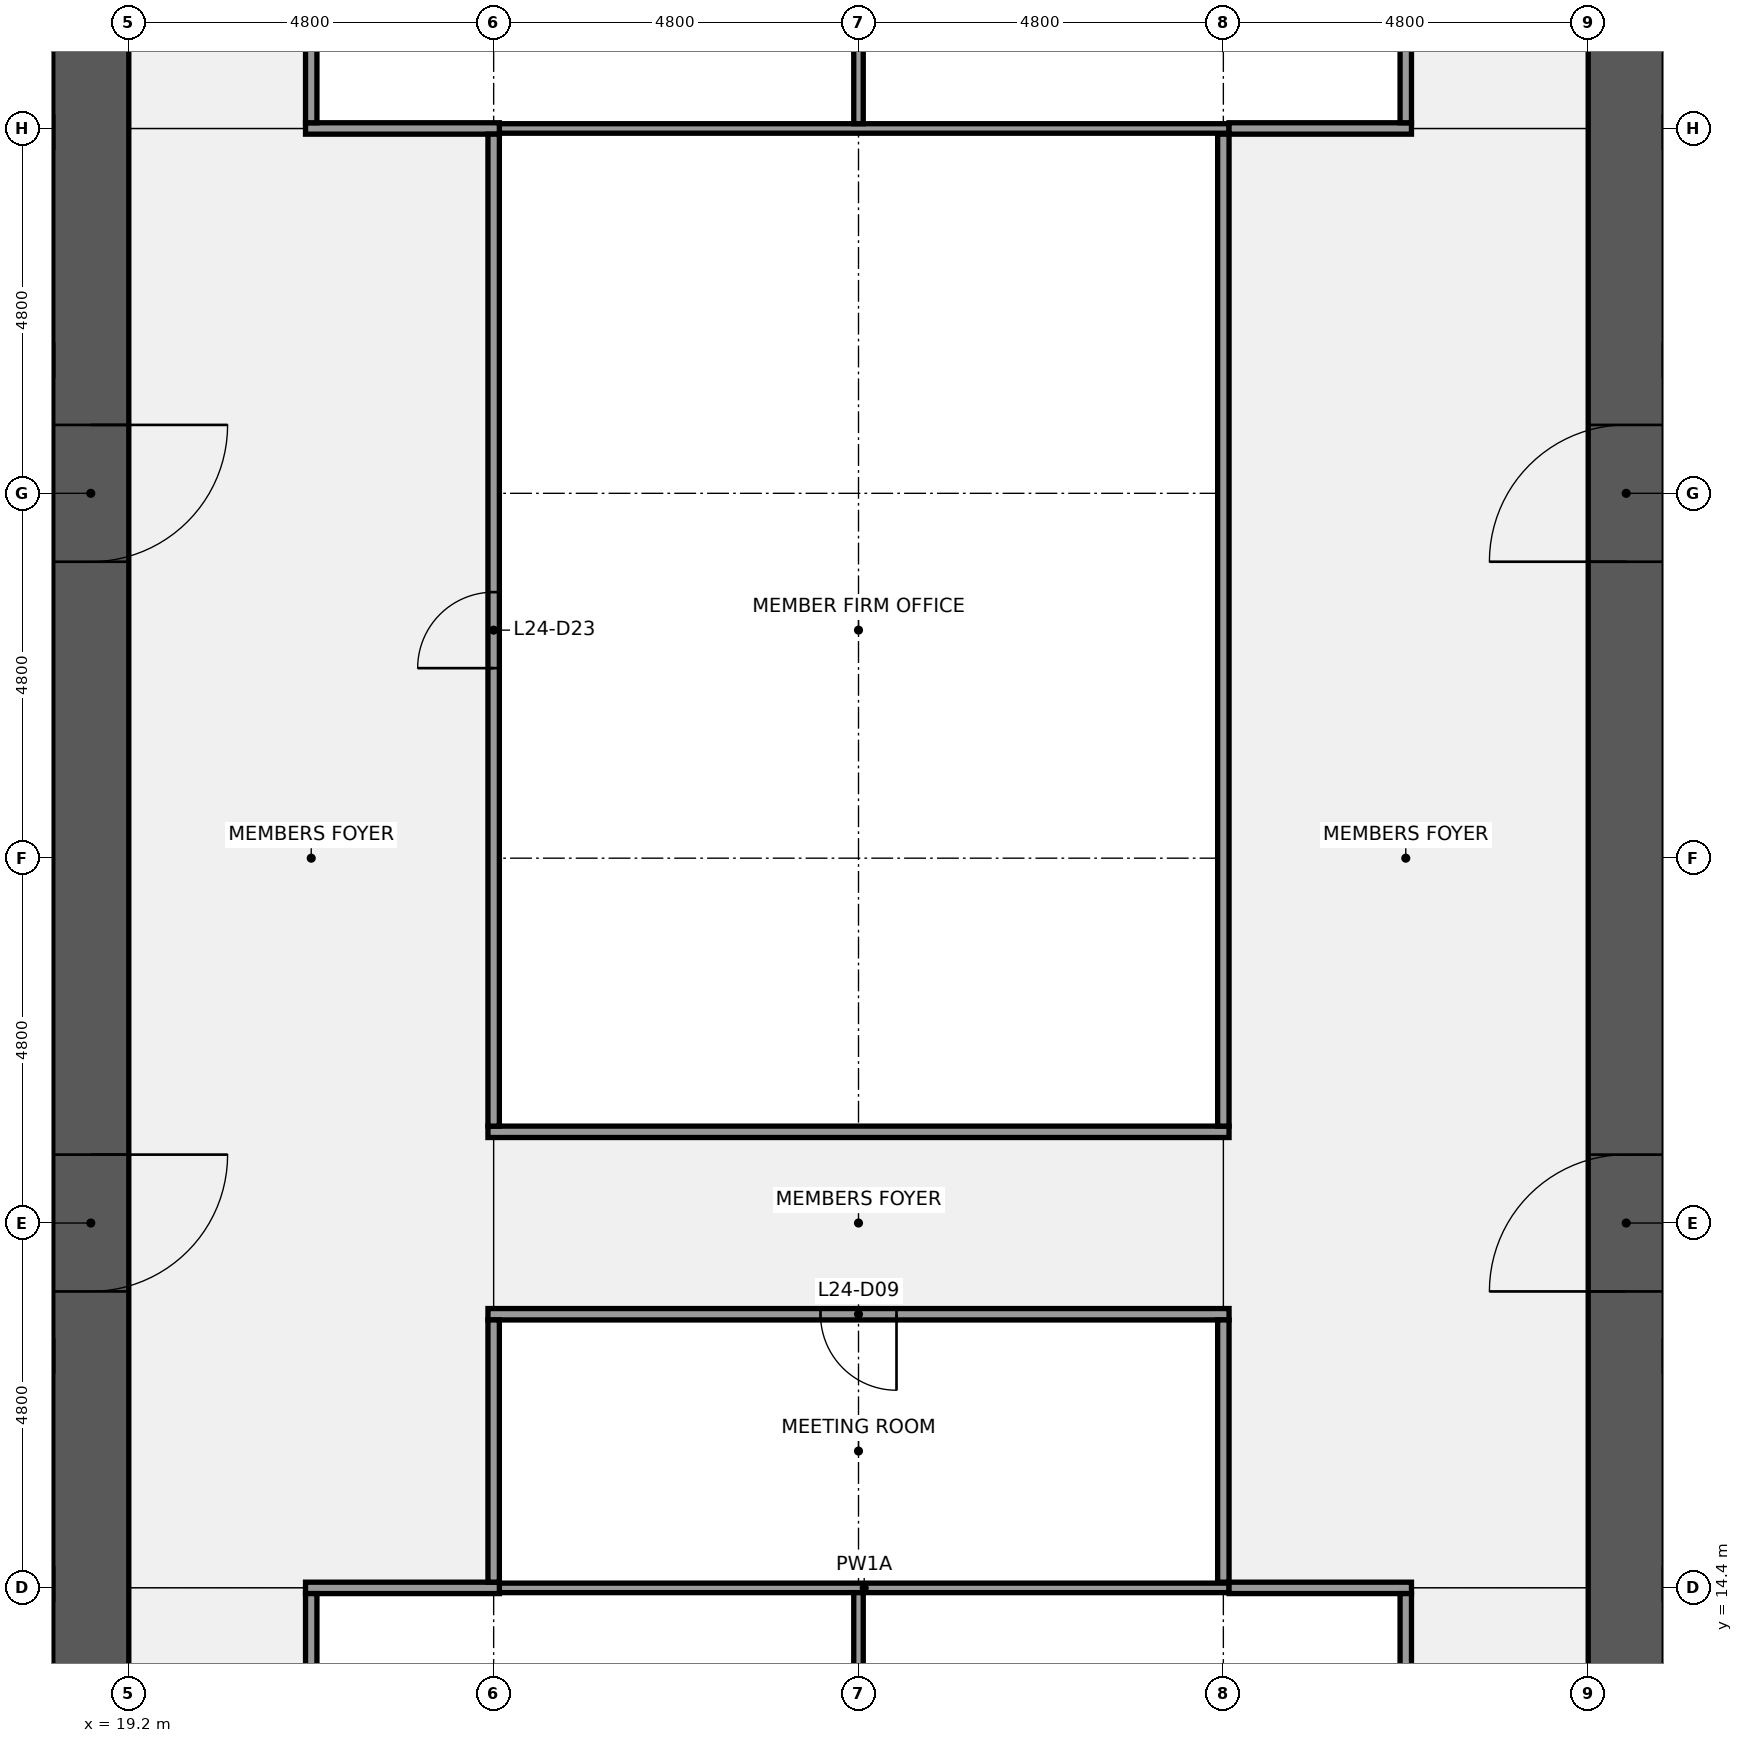
"""IFC4 building model, lengths in metres.
Left out: names, types, materials, properties, quantities, classifications, styles, units other than length and angle.
Written with IfcOpenShell. Run it as: python <this file> out.ifc"""

import sys

from ifc_helpers import new_model, si_unit, direction, frame, frame_2d, origin, place, context, subcontext, project, spatial, rectangle, extrude, element, fill, save


model = new_model("IFC4")
c1 = context("Model", 3, precision=1e-05, world=origin(), true_north=direction((0.0, 1.0)))
c2 = subcontext(c1, "Body", "Model", "MODEL_VIEW")
j1 = project(units=[si_unit("LENGTHUNIT", "METRE"), si_unit("PLANEANGLEUNIT", "RADIAN")], contexts=[c1])
p1 = place(None, origin())
s1 = spatial("IfcSite", under=j1, at=p1, CompositionType="ELEMENT")
p2 = place(p1, origin())
s2 = spatial("IfcBuilding", under=s1, at=p2, CompositionType="ELEMENT")
p3 = place(p2, frame((0.0, 0.0, 116.1)))
s3 = spatial("IfcBuildingStorey", under=s2, at=p3, CompositionType="ELEMENT", Elevation=116.1)
p4 = place(p3, frame((18.7, 38.4, 0.0), z_axis=(0.0, 0.0, 1.0), x_axis=(0.0, -1.0, 0.0)))
e1 = element("IfcWall", 1, at=p4, inside=s3, PredefinedType="SHEAR", context=c2, shape_type="SweptSolid", body=[
    extrude(rectangle(XDim=28.8, YDim=1.0, at=frame_2d((14.4, 0.0))), origin(), (0.0, 0.0, 1.0), 3.84),
])
p5 = place(p4, frame((18.3, 0.0, 0.0)))
e2 = element("IfcOpeningElement", 2, at=p5, cuts=e1, PredefinedType="OPENING", context=c2, shape_type="SweptSolid", body=[
    extrude(rectangle(XDim=1.8, YDim=2.1, at=frame_2d((0.9, 1.05))), frame((0.0, 0.51, 0.0), z_axis=(0.0, -1.0, 0.0), x_axis=(1.0, 0.0, 0.0)), (0.0, 0.0, 1.0), 1.02),
])
p6 = place(p4, frame((8.7, 0.0, 0.0)))
e3 = element("IfcOpeningElement", 3, at=p6, cuts=e1, PredefinedType="OPENING", context=c2, shape_type="SweptSolid", body=[
    extrude(rectangle(XDim=1.8, YDim=2.1, at=frame_2d((0.9, 1.05))), frame((0.0, 0.51, 0.0), z_axis=(0.0, -1.0, 0.0), x_axis=(1.0, 0.0, 0.0)), (0.0, 0.0, 1.0), 1.02),
])
p7 = place(p3, frame((1.0, 14.45, 0.0), z_axis=(0.0, 0.0, 1.0), x_axis=(1.0, 0.0, 0.0)))
e4 = element("IfcWall", 4, at=p7, inside=s3, PredefinedType="SHEAR", context=c2, shape_type="SweptSolid", body=[
    extrude(rectangle(XDim=17.2, YDim=0.4, at=frame_2d((8.6, 0.0))), origin(), (0.0, 0.0, 1.0), 3.84),
])
p8 = place(p3, frame((1.0, 17.45, 0.0), z_axis=(0.0, 0.0, 1.0), x_axis=(1.0, 0.0, 0.0)))
e5 = element("IfcWall", 5, at=p8, inside=s3, PredefinedType="SHEAR", context=c2, shape_type="SweptSolid", body=[
    extrude(rectangle(XDim=17.2, YDim=0.4, at=frame_2d((8.6, 0.0))), origin(), (0.0, 0.0, 1.0), 3.84),
])
p9 = place(p8, frame((3.163, 0.0, 0.0)))
e6 = element("IfcOpeningElement", 6, at=p9, cuts=e5, PredefinedType="OPENING", context=c2, shape_type="SweptSolid", body=[
    extrude(rectangle(XDim=1.0, YDim=2.1, at=frame_2d((0.5, 1.05))), frame((0.0, 0.21, 0.0), z_axis=(0.0, -1.0, 0.0), x_axis=(1.0, 0.0, 0.0)), (0.0, 0.0, 1.0), 0.42),
])
p10 = place(p8, frame((8.7, 0.0, 0.0)))
e7 = element("IfcOpeningElement", 7, at=p10, cuts=e5, PredefinedType="OPENING", context=c2, shape_type="SweptSolid", body=[
    extrude(rectangle(XDim=1.0, YDim=2.1, at=frame_2d((0.5, 1.05))), frame((0.0, 0.21, 0.0), z_axis=(0.0, -1.0, 0.0), x_axis=(1.0, 0.0, 0.0)), (0.0, 0.0, 1.0), 0.42),
])
p11 = place(p8, frame((12.0, 0.0, 0.0)))
e8 = element("IfcOpeningElement", 8, at=p11, cuts=e5, PredefinedType="OPENING", context=c2, shape_type="SweptSolid", body=[
    extrude(rectangle(XDim=1.0, YDim=2.1, at=frame_2d((0.5, 1.05))), frame((0.0, 0.21, 0.0), z_axis=(0.0, -1.0, 0.0), x_axis=(1.0, 0.0, 0.0)), (0.0, 0.0, 1.0), 0.42),
])
p12 = place(p8, frame((15.137, 0.0, 0.0)))
e9 = element("IfcOpeningElement", 9, at=p12, cuts=e5, PredefinedType="OPENING", context=c2, shape_type="SweptSolid", body=[
    extrude(rectangle(XDim=1.0, YDim=2.1, at=frame_2d((0.5, 1.05))), frame((0.0, 0.21, 0.0), z_axis=(0.0, -1.0, 0.0), x_axis=(1.0, 0.0, 0.0)), (0.0, 0.0, 1.0), 0.42),
])
p13 = place(p3, frame((1.0, 30.55, 0.0), z_axis=(0.0, 0.0, 1.0), x_axis=(1.0, 0.0, 0.0)))
e10 = element("IfcWall", 10, at=p13, inside=s3, PredefinedType="SHEAR", context=c2, shape_type="SweptSolid", body=[
    extrude(rectangle(XDim=17.2, YDim=0.4, at=frame_2d((8.6, 0.0))), origin(), (0.0, 0.0, 1.0), 3.84),
])
p14 = place(p13, frame((0.762, 0.0, 0.0)))
e11 = element("IfcOpeningElement", 11, at=p14, cuts=e10, PredefinedType="OPENING", context=c2, shape_type="SweptSolid", body=[
    extrude(rectangle(XDim=1.0, YDim=2.1, at=frame_2d((0.5, 1.05))), frame((0.0, 0.21, 0.0), z_axis=(0.0, -1.0, 0.0), x_axis=(1.0, 0.0, 0.0)), (0.0, 0.0, 1.0), 0.42),
])
p15 = place(p13, frame((4.5, 0.0, 0.0)))
e12 = element("IfcOpeningElement", 12, at=p15, cuts=e10, PredefinedType="OPENING", context=c2, shape_type="SweptSolid", body=[
    extrude(rectangle(XDim=1.0, YDim=2.1, at=frame_2d((0.5, 1.05))), frame((0.0, 0.21, 0.0), z_axis=(0.0, -1.0, 0.0), x_axis=(1.0, 0.0, 0.0)), (0.0, 0.0, 1.0), 0.42),
])
p16 = place(p13, frame((8.4, 0.0, 0.0)))
e13 = element("IfcOpeningElement", 13, at=p16, cuts=e10, PredefinedType="OPENING", context=c2, shape_type="SweptSolid", body=[
    extrude(rectangle(XDim=1.0, YDim=2.1, at=frame_2d((0.5, 1.05))), frame((0.0, 0.21, 0.0), z_axis=(0.0, -1.0, 0.0), x_axis=(1.0, 0.0, 0.0)), (0.0, 0.0, 1.0), 0.42),
])
p17 = place(p13, frame((11.4, 0.0, 0.0)))
e14 = element("IfcOpeningElement", 14, at=p17, cuts=e10, PredefinedType="OPENING", context=c2, shape_type="SweptSolid", body=[
    extrude(rectangle(XDim=1.0, YDim=2.1, at=frame_2d((0.5, 1.05))), frame((0.0, 0.21, 0.0), z_axis=(0.0, -1.0, 0.0), x_axis=(1.0, 0.0, 0.0)), (0.0, 0.0, 1.0), 0.42),
])
p18 = place(p13, frame((14.837, 0.0, 0.0)))
e15 = element("IfcOpeningElement", 15, at=p18, cuts=e10, PredefinedType="OPENING", context=c2, shape_type="SweptSolid", body=[
    extrude(rectangle(XDim=1.0, YDim=2.1, at=frame_2d((0.5, 1.05))), frame((0.0, 0.21, 0.0), z_axis=(0.0, -1.0, 0.0), x_axis=(1.0, 0.0, 0.0)), (0.0, 0.0, 1.0), 0.42),
])
p19 = place(p3, frame((1.0, 33.55, 0.0), z_axis=(0.0, 0.0, 1.0), x_axis=(1.0, 0.0, 0.0)))
e16 = element("IfcWall", 16, at=p19, inside=s3, PredefinedType="SHEAR", context=c2, shape_type="SweptSolid", body=[
    extrude(rectangle(XDim=17.2, YDim=0.4, at=frame_2d((8.6, 0.0))), origin(), (0.0, 0.0, 1.0), 3.84),
])
p20 = place(p3, frame((38.9, 9.6, 0.0), z_axis=(0.0, 0.0, 1.0), x_axis=(0.0, 1.0, 0.0)))
e17 = element("IfcWall", 17, at=p20, inside=s3, PredefinedType="SHEAR", context=c2, shape_type="SweptSolid", body=[
    extrude(rectangle(XDim=28.8, YDim=1.0, at=frame_2d((14.4, 0.0))), origin(), (0.0, 0.0, 1.0), 3.84),
])
p21 = place(p20, frame((8.7, 0.0, 0.0)))
e18 = element("IfcOpeningElement", 18, at=p21, cuts=e17, PredefinedType="OPENING", context=c2, shape_type="SweptSolid", body=[
    extrude(rectangle(XDim=1.8, YDim=2.1, at=frame_2d((0.9, 1.05))), frame((0.0, 0.51, 0.0), z_axis=(0.0, -1.0, 0.0), x_axis=(1.0, 0.0, 0.0)), (0.0, 0.0, 1.0), 1.02),
])
p22 = place(p20, frame((18.3, 0.0, 0.0)))
e19 = element("IfcOpeningElement", 19, at=p22, cuts=e17, PredefinedType="OPENING", context=c2, shape_type="SweptSolid", body=[
    extrude(rectangle(XDim=1.8, YDim=2.1, at=frame_2d((0.9, 1.05))), frame((0.0, 0.51, 0.0), z_axis=(0.0, -1.0, 0.0), x_axis=(1.0, 0.0, 0.0)), (0.0, 0.0, 1.0), 1.02),
])
p23 = place(p3, frame((24.075, 14.4, 0.0), z_axis=(0.0, 0.0, 1.0), x_axis=(1.0, 0.0, 0.0)))
e20 = element("IfcWall", 20, at=p23, inside=s3, PredefinedType="PARTITIONING", context=c2, shape_type="SweptSolid", body=[
    extrude(rectangle(XDim=9.6, YDim=0.125, at=frame_2d((4.8, 0.0))), origin(), (0.0, 0.0, 1.0), 2.936),
])
p24 = place(p3, frame((21.525, 14.4, 0.0), z_axis=(0.0, 0.0, 1.0), x_axis=(1.0, 0.0, 0.0)))
e21 = element("IfcWall", 21, at=p24, inside=s3, PredefinedType="PARTITIONING", context=c2, shape_type="SweptSolid", body=[
    extrude(rectangle(XDim=2.55, YDim=0.15, at=frame_2d((1.275, 0.0))), origin(), (0.0, 0.0, 1.0), 2.936),
])
p25 = place(p3, frame((33.675, 14.4, 0.0), z_axis=(0.0, 0.0, 1.0), x_axis=(1.0, 0.0, 0.0)))
e22 = element("IfcWall", 22, at=p25, inside=s3, PredefinedType="PARTITIONING", context=c2, shape_type="SweptSolid", body=[
    extrude(rectangle(XDim=2.4, YDim=0.15, at=frame_2d((1.2, 0.0))), origin(), (0.0, 0.0, 1.0), 2.936),
])
p26 = place(p3, frame((23.925, 18.0, 0.0), z_axis=(0.0, 0.0, 1.0), x_axis=(1.0, 0.0, 0.0)))
e23 = element("IfcWall", 23, at=p26, inside=s3, PredefinedType="PARTITIONING", context=c2, shape_type="SweptSolid", body=[
    extrude(rectangle(XDim=9.75, YDim=0.15, at=frame_2d((4.875, 0.0))), origin(), (0.0, 0.0, 1.0), 2.936),
])
p27 = place(p26, frame((4.375, 0.0, 0.0)))
e24 = element("IfcOpeningElement", 24, at=p27, cuts=e23, PredefinedType="OPENING", context=c2, shape_type="SweptSolid", body=[
    extrude(rectangle(XDim=1.0, YDim=2.1, at=frame_2d((0.5, 1.05))), frame((0.0, 0.085, 0.0), z_axis=(0.0, -1.0, 0.0), x_axis=(1.0, 0.0, 0.0)), (0.0, 0.0, 1.0), 0.17),
])
p28 = place(p3, frame((23.925, 20.4, 0.0), z_axis=(0.0, 0.0, 1.0), x_axis=(1.0, 0.0, 0.0)))
e25 = element("IfcWall", 25, at=p28, inside=s3, PredefinedType="PARTITIONING", context=c2, shape_type="SweptSolid", body=[
    extrude(rectangle(XDim=9.75, YDim=0.15, at=frame_2d((4.875, 0.0))), origin(), (0.0, 0.0, 1.0), 2.936),
])
p29 = place(p3, frame((24.075, 33.6, 0.0), z_axis=(0.0, 0.0, 1.0), x_axis=(1.0, 0.0, 0.0)))
e26 = element("IfcWall", 26, at=p29, inside=s3, PredefinedType="PARTITIONING", context=c2, shape_type="SweptSolid", body=[
    extrude(rectangle(XDim=9.6, YDim=0.125, at=frame_2d((4.8, 0.0))), origin(), (0.0, 0.0, 1.0), 2.936),
])
p30 = place(p3, frame((21.525, 33.6, 0.0), z_axis=(0.0, 0.0, 1.0), x_axis=(1.0, 0.0, 0.0)))
e27 = element("IfcWall", 27, at=p30, inside=s3, PredefinedType="PARTITIONING", context=c2, shape_type="SweptSolid", body=[
    extrude(rectangle(XDim=2.55, YDim=0.15, at=frame_2d((1.275, 0.0))), origin(), (0.0, 0.0, 1.0), 2.936),
])
p31 = place(p3, frame((33.675, 33.6, 0.0), z_axis=(0.0, 0.0, 1.0), x_axis=(1.0, 0.0, 0.0)))
e28 = element("IfcWall", 28, at=p31, inside=s3, PredefinedType="PARTITIONING", context=c2, shape_type="SweptSolid", body=[
    extrude(rectangle(XDim=2.4, YDim=0.15, at=frame_2d((1.2, 0.0))), origin(), (0.0, 0.0, 1.0), 2.936),
])
for number, where, z_axis, x_axis in (
    (29, (21.6, 9.675, 0.0), (0.0, 0.0, 1.0), (0.0, 1.0, 0.0)),
    (30, (21.6, 33.675, 0.0), (0.0, 0.0, 1.0), (0.0, 1.0, 0.0)),
):
    element("IfcWall", number, at=place(p3, frame(where, z_axis=z_axis, x_axis=x_axis)), inside=s3, PredefinedType="PARTITIONING", context=c2, shape_type="SweptSolid", body=[
        extrude(rectangle(XDim=4.65, YDim=0.15, at=frame_2d((2.325, 0.0))), origin(), (0.0, 0.0, 1.0), 2.936),
    ])
p32 = place(p3, frame((24.0, 14.475, 0.0), z_axis=(0.0, 0.0, 1.0), x_axis=(0.0, 1.0, 0.0)))
e31 = element("IfcWall", 31, at=p32, inside=s3, PredefinedType="PARTITIONING", context=c2, shape_type="SweptSolid", body=[
    extrude(rectangle(XDim=3.45, YDim=0.15, at=frame_2d((1.725, 0.0))), origin(), (0.0, 0.0, 1.0), 2.936),
])
p33 = place(p3, frame((24.0, 20.475, 0.0), z_axis=(0.0, 0.0, 1.0), x_axis=(0.0, 1.0, 0.0)))
e32 = element("IfcWall", 32, at=p33, inside=s3, PredefinedType="PARTITIONING", context=c2, shape_type="SweptSolid", body=[
    extrude(rectangle(XDim=13.05, YDim=0.15, at=frame_2d((6.525, 0.0))), origin(), (0.0, 0.0, 1.0), 2.936),
])
p34 = place(p33, frame((6.025, 0.0, 0.0)))
e33 = element("IfcOpeningElement", 33, at=p34, cuts=e32, PredefinedType="OPENING", context=c2, shape_type="SweptSolid", body=[
    extrude(rectangle(XDim=1.0, YDim=2.1, at=frame_2d((0.5, 1.05))), frame((0.0, 0.085, 0.0), z_axis=(0.0, -1.0, 0.0), x_axis=(1.0, 0.0, 0.0)), (0.0, 0.0, 1.0), 0.17),
])
for number, where, z_axis, x_axis in (
    (34, (28.8, 9.675, 0.0), (0.0, 0.0, 1.0), (0.0, 1.0, 0.0)),
    (35, (28.8, 33.663, 0.0), (0.0, 0.0, 1.0), (0.0, 1.0, 0.0)),
):
    element("IfcWall", number, at=place(p3, frame(where, z_axis=z_axis, x_axis=x_axis)), inside=s3, PredefinedType="PARTITIONING", context=c2, shape_type="SweptSolid", body=[
        extrude(rectangle(XDim=4.662, YDim=0.125, at=frame_2d((2.331, 0.0))), origin(), (0.0, 0.0, 1.0), 2.936),
    ])
p35 = place(p3, frame((33.6, 14.475, 0.0), z_axis=(0.0, 0.0, 1.0), x_axis=(0.0, 1.0, 0.0)))
e36 = element("IfcWall", 36, at=p35, inside=s3, PredefinedType="PARTITIONING", context=c2, shape_type="SweptSolid", body=[
    extrude(rectangle(XDim=3.45, YDim=0.15, at=frame_2d((1.725, 0.0))), origin(), (0.0, 0.0, 1.0), 2.936),
])
p36 = place(p3, frame((33.6, 20.475, 0.0), z_axis=(0.0, 0.0, 1.0), x_axis=(0.0, 1.0, 0.0)))
e37 = element("IfcWall", 37, at=p36, inside=s3, PredefinedType="PARTITIONING", context=c2, shape_type="SweptSolid", body=[
    extrude(rectangle(XDim=13.05, YDim=0.15, at=frame_2d((6.525, 0.0))), origin(), (0.0, 0.0, 1.0), 2.936),
])
for number, where, z_axis, x_axis in (
    (38, (36.0, 9.675, 0.0), (0.0, 0.0, 1.0), (0.0, 1.0, 0.0)),
    (39, (36.0, 33.675, 0.0), (0.0, 0.0, 1.0), (0.0, 1.0, 0.0)),
):
    element("IfcWall", number, at=place(p3, frame(where, z_axis=z_axis, x_axis=x_axis)), inside=s3, PredefinedType="PARTITIONING", context=c2, shape_type="SweptSolid", body=[
        extrude(rectangle(XDim=4.65, YDim=0.15, at=frame_2d((2.325, 0.0))), origin(), (0.0, 0.0, 1.0), 2.936),
    ])
p37 = place(p5, origin())
e40 = element("IfcDoor", 40, at=p37, inside=s3, OperationType="DOUBLE_DOOR_SINGLE_SWING", PredefinedType="DOOR", context=c2, shape_type="SweptSolid", body=[
    extrude(rectangle(XDim=1.8, YDim=2.1, at=frame_2d((0.9, 1.05))), frame((0.0, 0.025, 0.0), z_axis=(0.0, -1.0, 0.0), x_axis=(1.0, 0.0, 0.0)), (0.0, 0.0, 1.0), 0.05),
])
fill(e2, e40)
p38 = place(p6, origin())
e41 = element("IfcDoor", 41, at=p38, inside=s3, OperationType="DOUBLE_DOOR_SINGLE_SWING", PredefinedType="DOOR", context=c2, shape_type="SweptSolid", body=[
    extrude(rectangle(XDim=1.8, YDim=2.1, at=frame_2d((0.9, 1.05))), frame((0.0, 0.025, 0.0), z_axis=(0.0, -1.0, 0.0), x_axis=(1.0, 0.0, 0.0)), (0.0, 0.0, 1.0), 0.05),
])
fill(e3, e41)
p39 = place(p21, origin())
e42 = element("IfcDoor", 42, at=p39, inside=s3, OperationType="DOUBLE_DOOR_SINGLE_SWING", PredefinedType="DOOR", context=c2, shape_type="SweptSolid", body=[
    extrude(rectangle(XDim=1.8, YDim=2.1, at=frame_2d((0.9, 1.05))), frame((0.0, 0.025, 0.0), z_axis=(0.0, -1.0, 0.0), x_axis=(1.0, 0.0, 0.0)), (0.0, 0.0, 1.0), 0.05),
])
fill(e18, e42)
p40 = place(p22, origin())
e43 = element("IfcDoor", 43, at=p40, inside=s3, OperationType="DOUBLE_DOOR_SINGLE_SWING", PredefinedType="DOOR", context=c2, shape_type="SweptSolid", body=[
    extrude(rectangle(XDim=1.8, YDim=2.1, at=frame_2d((0.9, 1.05))), frame((0.0, 0.025, 0.0), z_axis=(0.0, -1.0, 0.0), x_axis=(1.0, 0.0, 0.0)), (0.0, 0.0, 1.0), 0.05),
])
fill(e19, e43)
p41 = place(p27, origin())
e44 = element("IfcDoor", 44, at=p41, inside=s3, OperationType="SINGLE_SWING_RIGHT", PredefinedType="DOOR", context=c2, shape_type="SweptSolid", body=[
    extrude(rectangle(XDim=1.0, YDim=2.1, at=frame_2d((0.5, 1.05))), frame((0.0, 0.025, 0.0), z_axis=(0.0, -1.0, 0.0), x_axis=(1.0, 0.0, 0.0)), (0.0, 0.0, 1.0), 0.05),
])
fill(e24, e44)
p42 = place(p34, origin())
e45 = element("IfcDoor", 45, at=p42, inside=s3, OperationType="SINGLE_SWING_LEFT", PredefinedType="DOOR", context=c2, shape_type="SweptSolid", body=[
    extrude(rectangle(XDim=1.0, YDim=2.1, at=frame_2d((0.5, 1.05))), frame((0.0, 0.025, 0.0), z_axis=(0.0, -1.0, 0.0), x_axis=(1.0, 0.0, 0.0)), (0.0, 0.0, 1.0), 0.05),
])
fill(e33, e45)
save(model, sys.argv[1])
